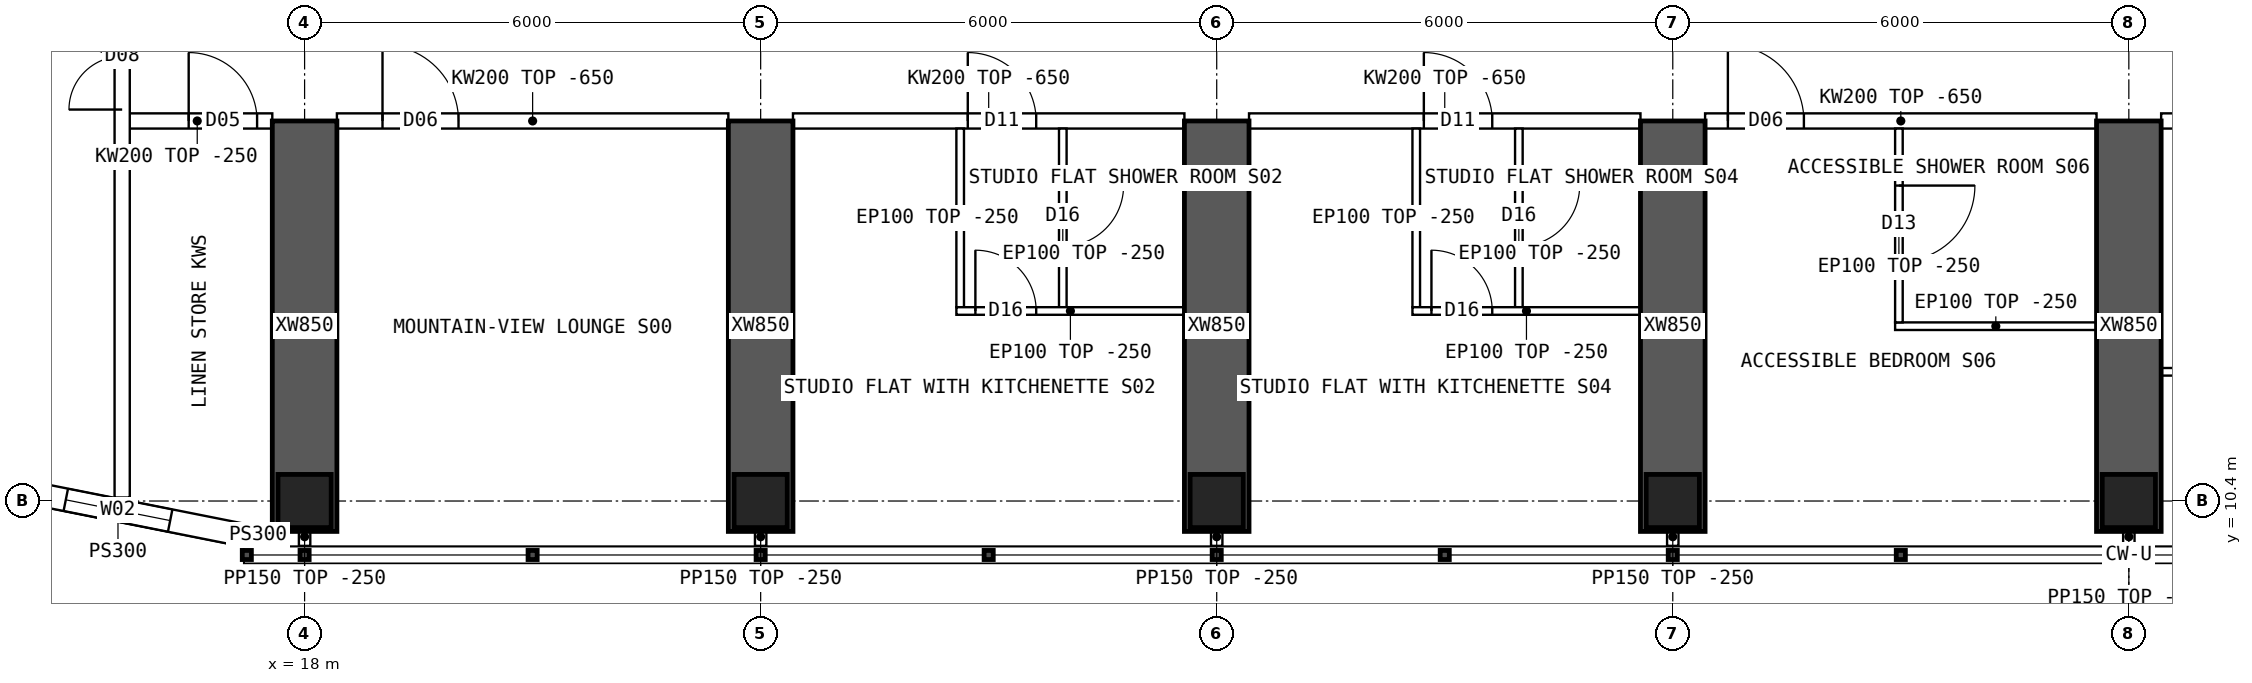
"""IFC4 building model, lengths in metres.
Left out: names, types, materials, properties, quantities, classifications, styles, units other than length and angle.
Written with IfcOpenShell. Run it as: python <this file> out.ifc"""

import sys

from ifc_helpers import new_model, si_unit, direction, frame, frame_2d, origin, origin_2d, place, context, subcontext, project, spatial, polyline, rectangle, hollow_rectangle, outline, extrude, element, fill, save


model = new_model("IFC4")
c1 = context("Model", 3, precision=1e-05, world=origin(), true_north=direction((0.0, 1.0)))
c2 = subcontext(c1, "Body", "Model", "MODEL_VIEW")
j1 = project(units=[si_unit("LENGTHUNIT", "METRE"), si_unit("PLANEANGLEUNIT", "RADIAN")], contexts=[c1])
p1 = place(None, origin())
s1 = spatial("IfcSite", under=j1, at=p1, CompositionType="ELEMENT")
p2 = place(p1, origin())
s2 = spatial("IfcBuilding", under=s1, at=p2, CompositionType="ELEMENT")
p3 = place(p2, frame((0.0, 0.0, 182.35)))
s3 = spatial("IfcBuildingStorey", under=s2, at=p3, CompositionType="ELEMENT", Elevation=182.35)
for number, where, z_axis, x_axis in (
    (1, (18.0, 10.4, 0.0), (0.0, 0.0, 1.0), (1.0, 0.0, 0.0)),
    (2, (24.0, 10.4, 0.0), (0.0, 0.0, 1.0), (1.0, 0.0, 0.0)),
    (3, (30.0, 10.4, 0.0), (0.0, 0.0, 1.0), (1.0, 0.0, 0.0)),
    (4, (36.0, 10.4, 0.0), (0.0, 0.0, 1.0), (1.0, 0.0, 0.0)),
    (5, (42.0, 10.4, 0.0), (0.0, 0.0, 1.0), (1.0, 0.0, 0.0)),
):
    element("IfcColumn", number, at=place(p3, frame(where, z_axis=z_axis, x_axis=x_axis)), inside=s3, PredefinedType="COLUMN", context=c2, shape_type="SweptSolid", body=[
        extrude(hollow_rectangle(XDim=0.7, YDim=0.7, WallThickness=0.07, at=origin_2d()), origin(), (0.0, 0.0, 1.0), 3.75),
    ])
for number, where, z_axis, x_axis in (
    (6, (18.0, 10.0, 0.0), (0.0, 0.0, 1.0), (0.0, 1.0, 0.0)),
    (7, (24.0, 10.0, 0.0), (0.0, 0.0, 1.0), (0.0, 1.0, 0.0)),
    (8, (30.0, 10.0, 0.0), (0.0, 0.0, 1.0), (0.0, 1.0, 0.0)),
    (9, (36.0, 10.0, 0.0), (0.0, 0.0, 1.0), (0.0, 1.0, 0.0)),
    (10, (42.0, 10.0, 0.0), (0.0, 0.0, 1.0), (0.0, 1.0, 0.0)),
):
    element("IfcWall", number, at=place(p3, frame(where, z_axis=z_axis, x_axis=x_axis)), inside=s3, PredefinedType="SHEAR", context=c2, shape_type="SweptSolid", body=[
        extrude(rectangle(XDim=5.4, YDim=0.85, at=frame_2d((2.7, 0.0))), origin(), (0.0, 0.0, 1.0), 3.75),
    ])
p4 = place(p3, frame((13.89, 10.608, 0.0), z_axis=(0.0, 0.0, 1.0), x_axis=(0.98078325777, -0.195100490205, 0.0)))
e11 = element("IfcWall", 11, at=p4, inside=s3, PredefinedType="SOLIDWALL", context=c2, shape_type="SweptSolid", body=[
    extrude(outline(polyline([(-0.03, -0.15), (3.405, -0.15), (3.345, 0.15), (0.03, 0.15), (-0.03, -0.15)])), origin(), (0.0, 0.0, 1.0), 3.5),
])
p5 = place(p4, frame((0.988, 0.0, 0.9)))
e12 = element("IfcOpeningElement", 12, at=p5, cuts=e11, PredefinedType="OPENING", context=c2, shape_type="SweptSolid", body=[
    extrude(rectangle(XDim=1.4, YDim=1.8, at=frame_2d((0.7, 0.9))), frame((0.0, 0.16, 0.0), z_axis=(0.0, -1.0, 0.0), x_axis=(1.0, 0.0, 0.0)), (0.0, 0.0, 1.0), 0.32),
])
p6 = place(p3, frame((17.2, 9.95, 0.0), z_axis=(0.0, 0.0, 1.0), x_axis=(1.0, 0.0, 0.0)))
e13 = element("IfcWall", 13, at=p6, inside=s3, PredefinedType="SOLIDWALL", context=c2, shape_type="SweptSolid", body=[
    extrude(rectangle(XDim=0.375, YDim=0.3, at=frame_2d((0.188, 0.0))), origin(), (0.0, 0.0, 1.0), 3.5),
])
p7 = place(p3, frame((15.6, 15.4, 0.0), z_axis=(0.0, 0.0, 1.0), x_axis=(1.0, 0.0, 0.0)))
e14 = element("IfcWall", 14, at=p7, inside=s3, PredefinedType="SOLIDWALL", context=c2, shape_type="SweptSolid", body=[
    extrude(rectangle(XDim=1.975, YDim=0.2, at=frame_2d((0.987, 0.0))), origin(), (0.0, 0.0, 1.0), 3.5),
])
p8 = place(p7, frame((0.875, 0.0, 0.0)))
e15 = element("IfcOpeningElement", 15, at=p8, cuts=e14, PredefinedType="OPENING", context=c2, shape_type="SweptSolid", body=[
    extrude(rectangle(XDim=0.9, YDim=2.1, at=frame_2d((0.45, 1.05))), frame((0.0, 0.11, 0.0), z_axis=(0.0, -1.0, 0.0), x_axis=(1.0, 0.0, 0.0)), (0.0, 0.0, 1.0), 0.22),
])
p9 = place(p3, frame((18.425, 15.4, 0.0), z_axis=(0.0, 0.0, 1.0), x_axis=(1.0, 0.0, 0.0)))
e16 = element("IfcWall", 16, at=p9, inside=s3, PredefinedType="SOLIDWALL", context=c2, shape_type="SweptSolid", body=[
    extrude(outline(polyline([(0.0, 0.0), (5.15, 0.0), (5.15, 3.1), (0.0, 3.1), (0.0, 0.0)])), frame((0.0, 0.1, 0.0), z_axis=(0.0, -1.0, 0.0), x_axis=(1.0, 0.0, 0.0)), (0.0, 0.0, 1.0), 0.2),
])
p10 = place(p9, frame((0.6, 0.0, 0.0)))
e17 = element("IfcOpeningElement", 17, at=p10, cuts=e16, PredefinedType="OPENING", context=c2, shape_type="SweptSolid", body=[
    extrude(rectangle(XDim=1.0, YDim=2.1, at=frame_2d((0.5, 1.05))), frame((0.0, 0.11, 0.0), z_axis=(0.0, -1.0, 0.0), x_axis=(1.0, 0.0, 0.0)), (0.0, 0.0, 1.0), 0.22),
])
p11 = place(p3, frame((24.425, 15.4, 0.0), z_axis=(0.0, 0.0, 1.0), x_axis=(1.0, 0.0, 0.0)))
e18 = element("IfcWall", 18, at=p11, inside=s3, PredefinedType="SOLIDWALL", context=c2, shape_type="SweptSolid", body=[
    extrude(outline(polyline([(0.0, 0.0), (5.15, 0.0), (5.15, 3.1), (0.0, 3.1), (0.0, 0.0)])), frame((0.0, 0.1, 0.0), z_axis=(0.0, -1.0, 0.0), x_axis=(1.0, 0.0, 0.0)), (0.0, 0.0, 1.0), 0.2),
])
p12 = place(p11, frame((2.3, 0.0, 0.0)))
e19 = element("IfcOpeningElement", 19, at=p12, cuts=e18, PredefinedType="OPENING", context=c2, shape_type="SweptSolid", body=[
    extrude(rectangle(XDim=0.9, YDim=2.1, at=frame_2d((0.45, 1.05))), frame((0.0, 0.11, 0.0), z_axis=(0.0, -1.0, 0.0), x_axis=(1.0, 0.0, 0.0)), (0.0, 0.0, 1.0), 0.22),
])
p13 = place(p3, frame((30.425, 15.4, 0.0), z_axis=(0.0, 0.0, 1.0), x_axis=(1.0, 0.0, 0.0)))
e20 = element("IfcWall", 20, at=p13, inside=s3, PredefinedType="SOLIDWALL", context=c2, shape_type="SweptSolid", body=[
    extrude(outline(polyline([(0.0, 0.0), (5.15, 0.0), (5.15, 3.1), (0.0, 3.1), (0.0, 0.0)])), frame((0.0, 0.1, 0.0), z_axis=(0.0, -1.0, 0.0), x_axis=(1.0, 0.0, 0.0)), (0.0, 0.0, 1.0), 0.2),
])
p14 = place(p13, frame((2.3, 0.0, 0.0)))
e21 = element("IfcOpeningElement", 21, at=p14, cuts=e20, PredefinedType="OPENING", context=c2, shape_type="SweptSolid", body=[
    extrude(rectangle(XDim=0.9, YDim=2.1, at=frame_2d((0.45, 1.05))), frame((0.0, 0.11, 0.0), z_axis=(0.0, -1.0, 0.0), x_axis=(1.0, 0.0, 0.0)), (0.0, 0.0, 1.0), 0.22),
])
p15 = place(p3, frame((36.425, 15.4, 0.0), z_axis=(0.0, 0.0, 1.0), x_axis=(1.0, 0.0, 0.0)))
e22 = element("IfcWall", 22, at=p15, inside=s3, PredefinedType="SOLIDWALL", context=c2, shape_type="SweptSolid", body=[
    extrude(outline(polyline([(0.0, 0.0), (5.15, 0.0), (5.15, 3.1), (0.0, 3.1), (0.0, 0.0)])), frame((0.0, 0.1, 0.0), z_axis=(0.0, -1.0, 0.0), x_axis=(1.0, 0.0, 0.0)), (0.0, 0.0, 1.0), 0.2),
])
p16 = place(p15, frame((0.3, 0.0, 0.0)))
e23 = element("IfcOpeningElement", 23, at=p16, cuts=e22, PredefinedType="OPENING", context=c2, shape_type="SweptSolid", body=[
    extrude(rectangle(XDim=1.0, YDim=2.1, at=frame_2d((0.5, 1.05))), frame((0.0, 0.11, 0.0), z_axis=(0.0, -1.0, 0.0), x_axis=(1.0, 0.0, 0.0)), (0.0, 0.0, 1.0), 0.22),
])
p17 = place(p3, frame((42.425, 15.4, 0.0), z_axis=(0.0, 0.0, 1.0), x_axis=(1.0, 0.0, 0.0)))
e24 = element("IfcWall", 24, at=p17, inside=s3, PredefinedType="SOLIDWALL", context=c2, shape_type="SweptSolid", body=[
    extrude(outline(polyline([(0.0, 0.0), (5.15, 0.0), (5.15, 3.1), (0.0, 3.1), (0.0, 0.0)])), frame((0.0, 0.1, 0.0), z_axis=(0.0, -1.0, 0.0), x_axis=(1.0, 0.0, 0.0)), (0.0, 0.0, 1.0), 0.2),
])
p18 = place(p17, frame((2.6, 0.0, 0.0)))
e25 = element("IfcOpeningElement", 25, at=p18, cuts=e24, PredefinedType="OPENING", context=c2, shape_type="SweptSolid", body=[
    extrude(rectangle(XDim=0.9, YDim=2.1, at=frame_2d((0.45, 1.05))), frame((0.0, 0.11, 0.0), z_axis=(0.0, -1.0, 0.0), x_axis=(1.0, 0.0, 0.0)), (0.0, 0.0, 1.0), 0.22),
])
p19 = place(p3, frame((29.575, 12.9, 0.0), z_axis=(0.0, 0.0, 1.0), x_axis=(-1.0, 0.0, 0.0)))
e26 = element("IfcWall", 26, at=p19, inside=s3, PredefinedType="PARTITIONING", context=c2, shape_type="SweptSolid", body=[
    extrude(rectangle(XDim=3.0, YDim=0.1, at=frame_2d((1.5, 0.0))), origin(), (0.0, 0.0, 1.0), 3.5),
])
p20 = place(p19, frame((1.95, 0.0, 0.0)))
e27 = element("IfcOpeningElement", 27, at=p20, cuts=e26, PredefinedType="OPENING", context=c2, shape_type="SweptSolid", body=[
    extrude(rectangle(XDim=0.8, YDim=2.1, at=frame_2d((0.4, 1.05))), frame((0.0, 0.06, 0.0), z_axis=(0.0, -1.0, 0.0), x_axis=(1.0, 0.0, 0.0)), (0.0, 0.0, 1.0), 0.12),
])
p21 = place(p3, frame((26.625, 12.95, 0.0), z_axis=(0.0, 0.0, 1.0), x_axis=(0.0, 1.0, 0.0)))
e28 = element("IfcWall", 28, at=p21, inside=s3, PredefinedType="PARTITIONING", context=c2, shape_type="SweptSolid", body=[
    extrude(outline(polyline([(0.0, 0.0), (2.35, 0.0), (2.35, 3.1), (2.302, 3.1), (2.3, 3.5), (0.0, 3.5), (0.0, 0.0)])), frame((0.0, 0.05, 0.0), z_axis=(0.0, -1.0, 0.0), x_axis=(1.0, 0.0, 0.0)), (0.0, 0.0, 1.0), 0.1),
])
p22 = place(p3, frame((27.975, 12.95, 0.0), z_axis=(0.0, 0.0, 1.0), x_axis=(0.0, 1.0, 0.0)))
e29 = element("IfcWall", 29, at=p22, inside=s3, PredefinedType="PARTITIONING", context=c2, shape_type="SweptSolid", body=[
    extrude(outline(polyline([(0.0, 0.0), (2.35, 0.0), (2.35, 3.1), (2.302, 3.1), (2.3, 3.5), (0.0, 3.5), (0.0, 0.0)])), frame((0.0, 0.05, 0.0), z_axis=(0.0, -1.0, 0.0), x_axis=(1.0, 0.0, 0.0)), (0.0, 0.0, 1.0), 0.1),
])
p23 = place(p22, frame((0.8, 0.0, 0.0)))
e30 = element("IfcOpeningElement", 30, at=p23, cuts=e29, PredefinedType="OPENING", context=c2, shape_type="SweptSolid", body=[
    extrude(rectangle(XDim=0.8, YDim=2.1, at=frame_2d((0.4, 1.05))), frame((0.0, 0.06, 0.0), z_axis=(0.0, -1.0, 0.0), x_axis=(1.0, 0.0, 0.0)), (0.0, 0.0, 1.0), 0.12),
])
p24 = place(p3, frame((35.575, 12.9, 0.0), z_axis=(0.0, 0.0, 1.0), x_axis=(-1.0, 0.0, 0.0)))
e31 = element("IfcWall", 31, at=p24, inside=s3, PredefinedType="PARTITIONING", context=c2, shape_type="SweptSolid", body=[
    extrude(rectangle(XDim=3.0, YDim=0.1, at=frame_2d((1.5, 0.0))), origin(), (0.0, 0.0, 1.0), 3.5),
])
p25 = place(p24, frame((1.95, 0.0, 0.0)))
e32 = element("IfcOpeningElement", 32, at=p25, cuts=e31, PredefinedType="OPENING", context=c2, shape_type="SweptSolid", body=[
    extrude(rectangle(XDim=0.8, YDim=2.1, at=frame_2d((0.4, 1.05))), frame((0.0, 0.06, 0.0), z_axis=(0.0, -1.0, 0.0), x_axis=(1.0, 0.0, 0.0)), (0.0, 0.0, 1.0), 0.12),
])
p26 = place(p3, frame((32.625, 12.95, 0.0), z_axis=(0.0, 0.0, 1.0), x_axis=(0.0, 1.0, 0.0)))
e33 = element("IfcWall", 33, at=p26, inside=s3, PredefinedType="PARTITIONING", context=c2, shape_type="SweptSolid", body=[
    extrude(outline(polyline([(0.0, 0.0), (2.35, 0.0), (2.35, 3.1), (2.302, 3.1), (2.3, 3.5), (0.0, 3.5), (0.0, 0.0)])), frame((0.0, 0.05, 0.0), z_axis=(0.0, -1.0, 0.0), x_axis=(1.0, 0.0, 0.0)), (0.0, 0.0, 1.0), 0.1),
])
p27 = place(p3, frame((33.975, 12.95, 0.0), z_axis=(0.0, 0.0, 1.0), x_axis=(0.0, 1.0, 0.0)))
e34 = element("IfcWall", 34, at=p27, inside=s3, PredefinedType="PARTITIONING", context=c2, shape_type="SweptSolid", body=[
    extrude(outline(polyline([(0.0, 0.0), (2.35, 0.0), (2.35, 3.1), (2.302, 3.1), (2.3, 3.5), (0.0, 3.5), (0.0, 0.0)])), frame((0.0, 0.05, 0.0), z_axis=(0.0, -1.0, 0.0), x_axis=(1.0, 0.0, 0.0)), (0.0, 0.0, 1.0), 0.1),
])
p28 = place(p27, frame((0.8, 0.0, 0.0)))
e35 = element("IfcOpeningElement", 35, at=p28, cuts=e34, PredefinedType="OPENING", context=c2, shape_type="SweptSolid", body=[
    extrude(rectangle(XDim=0.8, YDim=2.1, at=frame_2d((0.4, 1.05))), frame((0.0, 0.06, 0.0), z_axis=(0.0, -1.0, 0.0), x_axis=(1.0, 0.0, 0.0)), (0.0, 0.0, 1.0), 0.12),
])
p29 = place(p3, frame((38.925, 12.7, 0.0), z_axis=(0.0, 0.0, 1.0), x_axis=(1.0, 0.0, 0.0)))
e36 = element("IfcWall", 36, at=p29, inside=s3, PredefinedType="PARTITIONING", context=c2, shape_type="SweptSolid", body=[
    extrude(rectangle(XDim=2.65, YDim=0.1, at=frame_2d((1.325, 0.0))), origin(), (0.0, 0.0, 1.0), 3.5),
])
p30 = place(p3, frame((38.975, 12.75, 0.0), z_axis=(0.0, 0.0, 1.0), x_axis=(0.0, 1.0, 0.0)))
e37 = element("IfcWall", 37, at=p30, inside=s3, PredefinedType="PARTITIONING", context=c2, shape_type="SweptSolid", body=[
    extrude(outline(polyline([(0.0, 0.0), (2.55, 0.0), (2.55, 3.1), (2.502, 3.1), (2.5, 3.5), (0.0, 3.5), (0.0, 0.0)])), frame((0.0, 0.05, 0.0), z_axis=(0.0, -1.0, 0.0), x_axis=(1.0, 0.0, 0.0)), (0.0, 0.0, 1.0), 0.1),
])
p31 = place(p30, frame((0.8, 0.0, 0.0)))
e38 = element("IfcOpeningElement", 38, at=p31, cuts=e37, PredefinedType="OPENING", context=c2, shape_type="SweptSolid", body=[
    extrude(rectangle(XDim=1.0, YDim=2.1, at=frame_2d((0.5, 1.05))), frame((0.0, 0.06, 0.0), z_axis=(0.0, -1.0, 0.0), x_axis=(1.0, 0.0, 0.0)), (0.0, 0.0, 1.0), 0.12),
])
p32 = place(p3, frame((44.975, 12.1, 0.0), z_axis=(0.0, 0.0, 1.0), x_axis=(-1.0, 0.0, 0.0)))
e39 = element("IfcWall", 39, at=p32, inside=s3, PredefinedType="PARTITIONING", context=c2, shape_type="SweptSolid", body=[
    extrude(rectangle(XDim=2.55, YDim=0.1, at=frame_2d((1.275, 0.0))), origin(), (0.0, 0.0, 1.0), 3.5),
])
p33 = place(p32, frame((0.825, 0.0, 0.0)))
e40 = element("IfcOpeningElement", 40, at=p33, cuts=e39, PredefinedType="OPENING", context=c2, shape_type="SweptSolid", body=[
    extrude(rectangle(XDim=0.9, YDim=2.1, at=frame_2d((0.45, 1.05))), frame((0.0, 0.06, 0.0), z_axis=(0.0, -1.0, 0.0), x_axis=(1.0, 0.0, 0.0)), (0.0, 0.0, 1.0), 0.12),
])
p34 = place(p3, frame((15.6, 10.446, 0.0), z_axis=(0.0, 0.0, 1.0), x_axis=(0.0, 1.0, 0.0)))
e41 = element("IfcWall", 41, at=p34, inside=s3, PredefinedType="SOLIDWALL", context=c2, shape_type="SweptSolid", body=[
    extrude(rectangle(XDim=43.107, YDim=0.2, at=frame_2d((21.554, 0.0))), origin(), (0.0, 0.0, 1.0), 3.5),
])
p35 = place(p34, frame((5.104, 0.0, 0.0)))
e42 = element("IfcOpeningElement", 42, at=p35, cuts=e41, PredefinedType="OPENING", context=c2, shape_type="SweptSolid", body=[
    extrude(rectangle(XDim=1.4, YDim=2.1, at=frame_2d((0.7, 1.05))), frame((0.0, 0.11, 0.0), z_axis=(0.0, -1.0, 0.0), x_axis=(1.0, 0.0, 0.0)), (0.0, 0.0, 1.0), 0.22),
])
p36 = place(p34, frame((36.504, 0.0, 0.0)))
e43 = element("IfcOpeningElement", 43, at=p36, cuts=e41, PredefinedType="OPENING", context=c2, shape_type="SweptSolid", body=[
    extrude(rectangle(XDim=1.4, YDim=2.1, at=frame_2d((0.7, 1.05))), frame((0.0, 0.11, 0.0), z_axis=(0.0, -1.0, 0.0), x_axis=(1.0, 0.0, 0.0)), (0.0, 0.0, 1.0), 0.22),
])
for number, where, z_axis, x_axis in (
    (44, (18.0, 10.05, 0.0), (0.0, 0.0, 1.0), (0.0, -1.0, 0.0)),
    (45, (24.0, 10.05, 0.0), (0.0, 0.0, 1.0), (0.0, -1.0, 0.0)),
    (46, (30.0, 10.05, 0.0), (0.0, 0.0, 1.0), (0.0, -1.0, 0.0)),
    (47, (36.0, 10.05, 0.0), (0.0, 0.0, 1.0), (0.0, -1.0, 0.0)),
    (48, (42.0, 10.05, 0.0), (0.0, 0.0, 1.0), (0.0, -1.0, 0.0)),
):
    element("IfcWall", number, at=place(p3, frame(where, z_axis=z_axis, x_axis=x_axis)), inside=s3, PredefinedType="PARTITIONING", context=c2, shape_type="SweptSolid", body=[
        extrude(rectangle(XDim=0.24, YDim=0.15, at=frame_2d((0.12, 0.0))), origin(), (0.0, 0.0, 1.0), 3.5),
    ])
p37 = place(p5, origin())
e49 = element("IfcWindow", 49, at=p37, inside=s3, PartitioningType="SINGLE_PANEL", PredefinedType="WINDOW", context=c2, shape_type="SweptSolid", body=[
    extrude(rectangle(XDim=1.4, YDim=1.8, at=frame_2d((0.7, 0.9))), frame((0.0, 0.03, 0.0), z_axis=(0.0, -1.0, 0.0), x_axis=(1.0, 0.0, 0.0)), (0.0, 0.0, 1.0), 0.06),
])
fill(e12, e49)
p38 = place(p10, origin())
e50 = element("IfcDoor", 50, at=p38, inside=s3, OperationType="SINGLE_SWING_LEFT", PredefinedType="DOOR", context=c2, shape_type="SweptSolid", body=[
    extrude(rectangle(XDim=1.0, YDim=2.1, at=frame_2d((0.5, 1.05))), frame((0.0, 0.025, 0.0), z_axis=(0.0, -1.0, 0.0), x_axis=(1.0, 0.0, 0.0)), (0.0, 0.0, 1.0), 0.05),
])
fill(e17, e50)
p39 = place(p20, origin())
e51 = element("IfcDoor", 51, at=p39, inside=s3, OperationType="SINGLE_SWING_RIGHT", PredefinedType="DOOR", context=c2, shape_type="SweptSolid", body=[
    extrude(rectangle(XDim=0.8, YDim=2.1, at=frame_2d((0.4, 1.05))), frame((0.0, 0.025, 0.0), z_axis=(0.0, -1.0, 0.0), x_axis=(1.0, 0.0, 0.0)), (0.0, 0.0, 1.0), 0.05),
])
fill(e27, e51)
p40 = place(p23, origin())
e52 = element("IfcDoor", 52, at=p40, inside=s3, OperationType="SINGLE_SWING_RIGHT", PredefinedType="DOOR", context=c2, shape_type="SweptSolid", body=[
    extrude(rectangle(XDim=0.8, YDim=2.1, at=frame_2d((0.4, 1.05))), frame((0.0, 0.025, 0.0), z_axis=(0.0, -1.0, 0.0), x_axis=(1.0, 0.0, 0.0)), (0.0, 0.0, 1.0), 0.05),
])
fill(e30, e52)
p41 = place(p12, origin())
e53 = element("IfcDoor", 53, at=p41, inside=s3, OperationType="SINGLE_SWING_LEFT", PredefinedType="DOOR", context=c2, shape_type="SweptSolid", body=[
    extrude(rectangle(XDim=0.9, YDim=2.1, at=frame_2d((0.45, 1.05))), frame((0.0, 0.025, 0.0), z_axis=(0.0, -1.0, 0.0), x_axis=(1.0, 0.0, 0.0)), (0.0, 0.0, 1.0), 0.05),
])
fill(e19, e53)
p42 = place(p25, origin())
e54 = element("IfcDoor", 54, at=p42, inside=s3, OperationType="SINGLE_SWING_RIGHT", PredefinedType="DOOR", context=c2, shape_type="SweptSolid", body=[
    extrude(rectangle(XDim=0.8, YDim=2.1, at=frame_2d((0.4, 1.05))), frame((0.0, 0.025, 0.0), z_axis=(0.0, -1.0, 0.0), x_axis=(1.0, 0.0, 0.0)), (0.0, 0.0, 1.0), 0.05),
])
fill(e32, e54)
p43 = place(p28, origin())
e55 = element("IfcDoor", 55, at=p43, inside=s3, OperationType="SINGLE_SWING_RIGHT", PredefinedType="DOOR", context=c2, shape_type="SweptSolid", body=[
    extrude(rectangle(XDim=0.8, YDim=2.1, at=frame_2d((0.4, 1.05))), frame((0.0, 0.025, 0.0), z_axis=(0.0, -1.0, 0.0), x_axis=(1.0, 0.0, 0.0)), (0.0, 0.0, 1.0), 0.05),
])
fill(e35, e55)
p44 = place(p14, origin())
e56 = element("IfcDoor", 56, at=p44, inside=s3, OperationType="SINGLE_SWING_LEFT", PredefinedType="DOOR", context=c2, shape_type="SweptSolid", body=[
    extrude(rectangle(XDim=0.9, YDim=2.1, at=frame_2d((0.45, 1.05))), frame((0.0, 0.025, 0.0), z_axis=(0.0, -1.0, 0.0), x_axis=(1.0, 0.0, 0.0)), (0.0, 0.0, 1.0), 0.05),
])
fill(e21, e56)
p45 = place(p31, origin())
e57 = element("IfcDoor", 57, at=p45, inside=s3, OperationType="SINGLE_SWING_RIGHT", PredefinedType="DOOR", context=c2, shape_type="SweptSolid", body=[
    extrude(rectangle(XDim=1.0, YDim=2.1, at=frame_2d((0.5, 1.05))), frame((0.0, 0.025, 0.0), z_axis=(0.0, -1.0, 0.0), x_axis=(1.0, 0.0, 0.0)), (0.0, 0.0, 1.0), 0.05),
])
fill(e38, e57)
p46 = place(p16, origin())
e58 = element("IfcDoor", 58, at=p46, inside=s3, OperationType="SINGLE_SWING_LEFT", PredefinedType="DOOR", context=c2, shape_type="SweptSolid", body=[
    extrude(rectangle(XDim=1.0, YDim=2.1, at=frame_2d((0.5, 1.05))), frame((0.0, 0.025, 0.0), z_axis=(0.0, -1.0, 0.0), x_axis=(1.0, 0.0, 0.0)), (0.0, 0.0, 1.0), 0.05),
])
fill(e23, e58)
p47 = place(p35, origin())
e59 = element("IfcDoor", 59, at=p47, inside=s3, OperationType="DOUBLE_DOOR_SINGLE_SWING", PredefinedType="DOOR", context=c2, shape_type="SweptSolid", body=[
    extrude(rectangle(XDim=1.4, YDim=2.1, at=frame_2d((0.7, 1.05))), frame((0.0, 0.025, 0.0), z_axis=(0.0, -1.0, 0.0), x_axis=(1.0, 0.0, 0.0)), (0.0, 0.0, 1.0), 0.05),
])
fill(e42, e59)
p48 = place(p8, origin())
e60 = element("IfcDoor", 60, at=p48, inside=s3, OperationType="SINGLE_SWING_LEFT", PredefinedType="DOOR", context=c2, shape_type="SweptSolid", body=[
    extrude(rectangle(XDim=0.9, YDim=2.1, at=frame_2d((0.45, 1.05))), frame((0.0, 0.025, 0.0), z_axis=(0.0, -1.0, 0.0), x_axis=(1.0, 0.0, 0.0)), (0.0, 0.0, 1.0), 0.05),
])
fill(e15, e60)
save(model, sys.argv[1])
